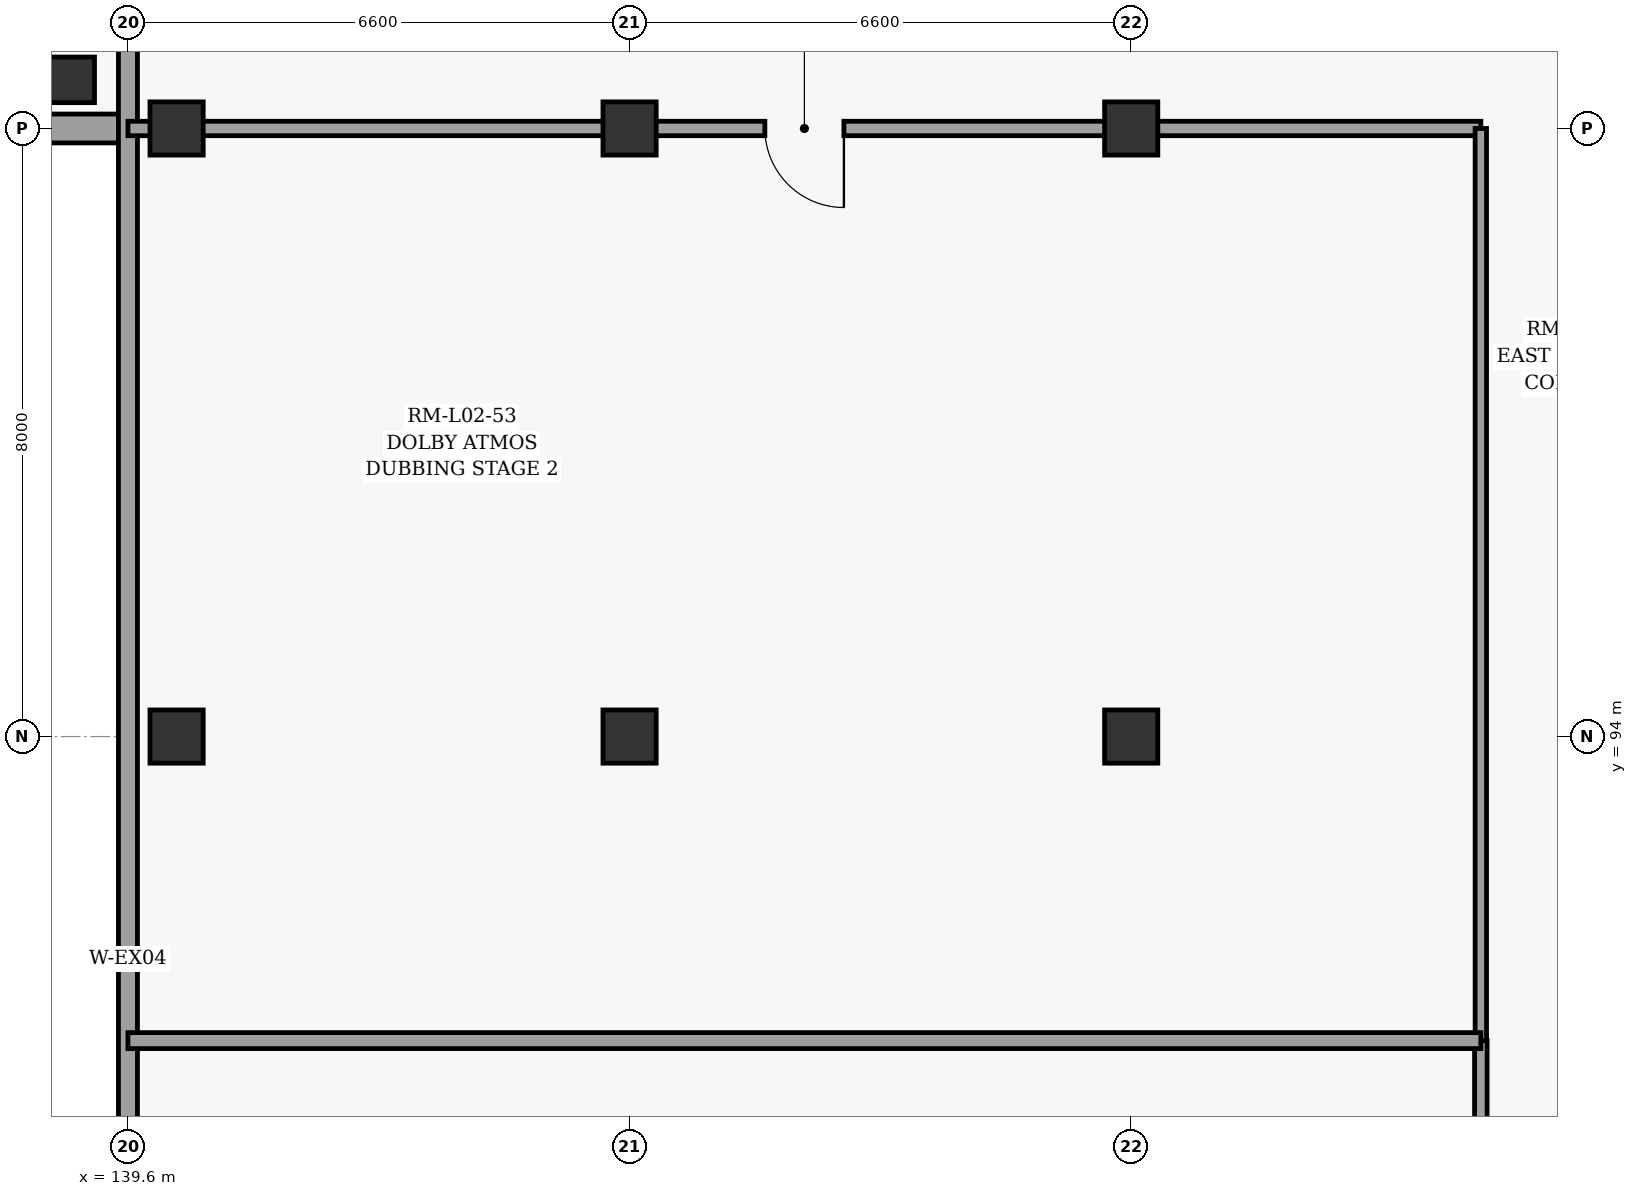
"""IFC4 building model, lengths in metres.
Left out: names, types, materials, properties, quantities, classifications, styles, units other than length and angle.
Written with IfcOpenShell. Run it as: python <this file> out.ifc"""

import sys

from ifc_helpers import new_model, si_unit, direction, frame, frame_2d, origin, origin_2d, place, context, subcontext, project, spatial, rectangle, extrude, element, fill, save


model = new_model("IFC4")
c1 = context("Model", 3, precision=1e-05, world=origin(), true_north=direction((0.0, 1.0)))
c2 = subcontext(c1, "Body", "Model", "MODEL_VIEW")
j1 = project(units=[si_unit("LENGTHUNIT", "METRE"), si_unit("PLANEANGLEUNIT", "RADIAN")], contexts=[c1])
p1 = place(None, origin())
s1 = spatial("IfcSite", under=j1, at=p1, CompositionType="ELEMENT")
p2 = place(p1, origin())
s2 = spatial("IfcBuilding", under=s1, at=p2, CompositionType="ELEMENT")
p3 = place(p2, frame((0.0, 0.0, 10.2)))
s3 = spatial("IfcBuildingStorey", under=s2, at=p3, CompositionType="ELEMENT", Elevation=10.2)
p4 = place(p3, frame((138.86, 102.64, 0.0), z_axis=(0.0, 0.0, 1.0), x_axis=(1.0, 0.0, 0.0)))
e1 = element("IfcColumn", 1, at=p4, inside=s3, PredefinedType="COLUMN", context=c2, shape_type="SweptSolid", body=[
    extrude(rectangle(XDim=0.6, YDim=0.6, at=origin_2d()), origin(), (0.0, 0.0, 1.0), 5.4),
])
for number, where, z_axis, x_axis in (
    (2, (140.24, 94.0, 0.0), (0.0, 0.0, 1.0), (1.0, 0.0, 0.0)),
    (3, (140.24, 102.0, 0.0), (0.0, 0.0, 1.0), (1.0, 0.0, 0.0)),
    (4, (146.2, 94.0, 0.0), (0.0, 0.0, 1.0), (1.0, 0.0, 0.0)),
    (5, (146.2, 102.0, 0.0), (0.0, 0.0, 1.0), (1.0, 0.0, 0.0)),
    (6, (152.8, 94.0, 0.0), (0.0, 0.0, 1.0), (1.0, 0.0, 0.0)),
    (7, (152.8, 102.0, 0.0), (0.0, 0.0, 1.0), (1.0, 0.0, 0.0)),
):
    element("IfcColumn", number, at=place(p3, frame(where, z_axis=z_axis, x_axis=x_axis)), inside=s3, PredefinedType="COLUMN", context=c2, shape_type="SweptSolid", body=[
        extrude(rectangle(XDim=0.7, YDim=0.7, at=origin_2d()), origin(), (0.0, 0.0, 1.0), 5.4),
    ])
p5 = place(p3, frame((139.5, 102.0, 0.0), z_axis=(0.0, 0.0, 1.0), x_axis=(-1.0, 0.0, 0.0)))
e8 = element("IfcWall", 8, at=p5, inside=s3, PredefinedType="SOLIDWALL", context=c2, shape_type="SweptSolid", body=[
    extrude(rectangle(XDim=44.7, YDim=0.38, at=frame_2d((22.35, 0.0))), origin(), (0.0, 0.0, 1.0), 5.16),
])
p6 = place(p5, frame((2.2, 0.0, 0.9)))
e9 = element("IfcOpeningElement", 9, at=p6, cuts=e8, PredefinedType="OPENING", context=c2, shape_type="SweptSolid", body=[
    extrude(rectangle(XDim=3.6, YDim=2.6, at=frame_2d((1.8, 1.3))), frame((0.0, 0.2, 0.0), z_axis=(0.0, -1.0, 0.0), x_axis=(1.0, 0.0, 0.0)), (0.0, 0.0, 1.0), 0.4),
])
p7 = place(p5, frame((9.05, 0.0, 0.9)))
e10 = element("IfcOpeningElement", 10, at=p7, cuts=e8, PredefinedType="OPENING", context=c2, shape_type="SweptSolid", body=[
    extrude(rectangle(XDim=3.8, YDim=2.6, at=frame_2d((1.9, 1.3))), frame((0.0, 0.2, 0.0), z_axis=(0.0, -1.0, 0.0), x_axis=(1.0, 0.0, 0.0)), (0.0, 0.0, 1.0), 0.4),
])
p8 = place(p5, frame((15.9, 0.0, 0.9)))
e11 = element("IfcOpeningElement", 11, at=p8, cuts=e8, PredefinedType="OPENING", context=c2, shape_type="SweptSolid", body=[
    extrude(rectangle(XDim=1.6, YDim=1.65, at=frame_2d((0.8, 0.825))), frame((0.0, 0.2, 0.0), z_axis=(0.0, -1.0, 0.0), x_axis=(1.0, 0.0, 0.0)), (0.0, 0.0, 1.0), 0.4),
])
p9 = place(p5, frame((22.75, 0.0, 0.9)))
e12 = element("IfcOpeningElement", 12, at=p9, cuts=e8, PredefinedType="OPENING", context=c2, shape_type="SweptSolid", body=[
    extrude(rectangle(XDim=1.8, YDim=1.65, at=frame_2d((0.9, 0.825))), frame((0.0, 0.2, 0.0), z_axis=(0.0, -1.0, 0.0), x_axis=(1.0, 0.0, 0.0)), (0.0, 0.0, 1.0), 0.4),
])
p10 = place(p5, frame((29.6, 0.0, 0.9)))
e13 = element("IfcOpeningElement", 13, at=p10, cuts=e8, PredefinedType="OPENING", context=c2, shape_type="SweptSolid", body=[
    extrude(rectangle(XDim=2.0, YDim=1.7, at=frame_2d((1.0, 0.85))), frame((0.0, 0.2, 0.0), z_axis=(0.0, -1.0, 0.0), x_axis=(1.0, 0.0, 0.0)), (0.0, 0.0, 1.0), 0.4),
])
p11 = place(p5, frame((36.45, 0.0, 0.9)))
e14 = element("IfcOpeningElement", 14, at=p11, cuts=e8, PredefinedType="OPENING", context=c2, shape_type="SweptSolid", body=[
    extrude(rectangle(XDim=2.2, YDim=1.7, at=frame_2d((1.1, 0.85))), frame((0.0, 0.2, 0.0), z_axis=(0.0, -1.0, 0.0), x_axis=(1.0, 0.0, 0.0)), (0.0, 0.0, 1.0), 0.4),
])
p12 = place(p3, frame((139.6, 71.74, 0.0), z_axis=(0.0, 0.0, 1.0), x_axis=(0.0, 1.0, 0.0)))
e15 = element("IfcWall", 15, at=p12, inside=s3, PredefinedType="SOLIDWALL", context=c2, shape_type="SweptSolid", body=[
    extrude(rectangle(XDim=46.12, YDim=0.25, at=frame_2d((23.06, 0.0))), origin(), (0.0, 0.0, 1.0), 4.31),
])
p13 = place(p12, frame((31.38, 0.0, 0.0)))
e16 = element("IfcOpeningElement", 16, at=p13, cuts=e15, PredefinedType="OPENING", context=c2, shape_type="SweptSolid", body=[
    extrude(rectangle(XDim=1.4, YDim=2.25, at=frame_2d((0.7, 1.125))), frame((0.0, 0.135, 0.0), z_axis=(0.0, -1.0, 0.0), x_axis=(1.0, 0.0, 0.0)), (0.0, 0.0, 1.0), 0.27),
])
p14 = place(p3, frame((157.4, 102.0, 0.0), z_axis=(0.0, 0.0, 1.0), x_axis=(-1.0, 0.0, 0.0)))
e17 = element("IfcWall", 17, at=p14, inside=s3, PredefinedType="PARTITIONING", context=c2, shape_type="SweptSolid", body=[
    extrude(rectangle(XDim=17.8, YDim=0.19, at=frame_2d((8.9, 0.0))), origin(), (0.0, 0.0, 1.0), 4.51),
])
p15 = place(p14, frame((8.38, 0.0, 0.0)))
e18 = element("IfcOpeningElement", 18, at=p15, cuts=e17, PredefinedType="OPENING", context=c2, shape_type="SweptSolid", body=[
    extrude(rectangle(XDim=1.04, YDim=2.2, at=frame_2d((0.52, 1.1))), frame((0.0, 0.105, 0.0), z_axis=(0.0, -1.0, 0.0), x_axis=(1.0, 0.0, 0.0)), (0.0, 0.0, 1.0), 0.21),
])
p16 = place(p3, frame((157.4, 74.6, 0.0), z_axis=(0.0, 0.0, 1.0), x_axis=(0.0, 1.0, 0.0)))
e19 = element("IfcWall", 19, at=p16, inside=s3, PredefinedType="PARTITIONING", context=c2, shape_type="SweptSolid", body=[
    extrude(rectangle(XDim=15.4, YDim=0.165, at=frame_2d((7.7, 0.0))), origin(), (0.0, 0.0, 1.0), 5.16),
])
p17 = place(p16, frame((7.23, 0.0, 0.0)))
e20 = element("IfcOpeningElement", 20, at=p17, cuts=e19, PredefinedType="OPENING", context=c2, shape_type="SweptSolid", body=[
    extrude(rectangle(XDim=0.94, YDim=2.15, at=frame_2d((0.47, 1.075))), frame((0.0, 0.093, 0.0), z_axis=(0.0, -1.0, 0.0), x_axis=(1.0, 0.0, 0.0)), (0.0, 0.0, 1.0), 0.185),
])
p18 = place(p16, frame((11.542, 0.0, 0.0)))
e21 = element("IfcOpeningElement", 21, at=p18, cuts=e19, PredefinedType="OPENING", context=c2, shape_type="SweptSolid", body=[
    extrude(rectangle(XDim=0.94, YDim=2.15, at=frame_2d((0.47, 1.075))), frame((0.0, 0.093, 0.0), z_axis=(0.0, -1.0, 0.0), x_axis=(1.0, 0.0, 0.0)), (0.0, 0.0, 1.0), 0.185),
])
p19 = place(p3, frame((157.4, 90.0, 0.0), z_axis=(0.0, 0.0, 1.0), x_axis=(0.0, 1.0, 0.0)))
e22 = element("IfcWall", 22, at=p19, inside=s3, PredefinedType="PARTITIONING", context=c2, shape_type="SweptSolid", body=[
    extrude(rectangle(XDim=12.0, YDim=0.15, at=frame_2d((6.0, 0.0))), origin(), (0.0, 0.0, 1.0), 5.16),
])
p20 = place(p3, frame((139.6, 90.0, 0.0), z_axis=(0.0, 0.0, 1.0), x_axis=(1.0, 0.0, 0.0)))
e23 = element("IfcWall", 23, at=p20, inside=s3, PredefinedType="PARTITIONING", context=c2, shape_type="SweptSolid", body=[
    extrude(rectangle(XDim=17.8, YDim=0.21, at=frame_2d((8.9, 0.0))), origin(), (0.0, 0.0, 1.0), 5.16),
])
p21 = place(p15, origin())
e24 = element("IfcDoor", 24, at=p21, inside=s3, OperationType="SINGLE_SWING_LEFT", PredefinedType="DOOR", context=c2, shape_type="SweptSolid", body=[
    extrude(rectangle(XDim=1.04, YDim=2.2, at=frame_2d((0.52, 1.1))), frame((0.0, 0.025, 0.0), z_axis=(0.0, -1.0, 0.0), x_axis=(1.0, 0.0, 0.0)), (0.0, 0.0, 1.0), 0.05),
])
fill(e18, e24)
save(model, sys.argv[1])
